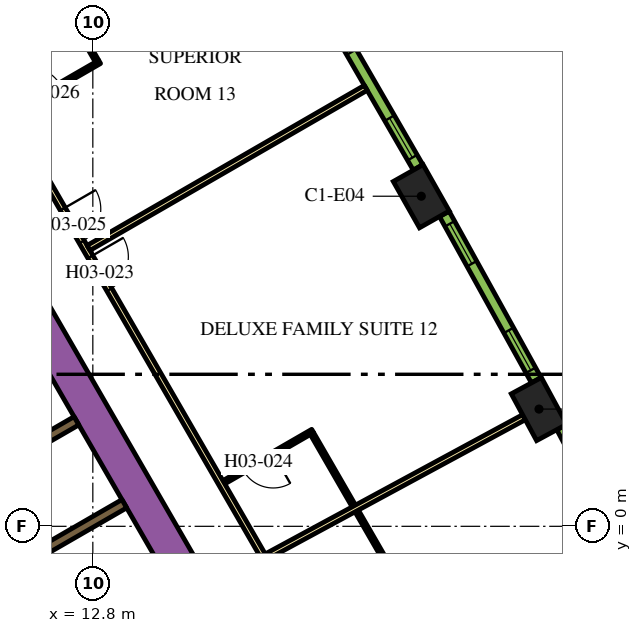
"""IFC4 building model, lengths in metres.
Left out: names, types, materials, properties, quantities, classifications, styles, units other than length and angle.
Written with IfcOpenShell. Run it as: python <this file> out.ifc"""

import sys

from ifc_helpers import new_model, si_unit, direction, frame, frame_2d, origin, origin_2d, place, context, subcontext, project, spatial, rectangle, extrude, element, fill, save


model = new_model("IFC4")
c1 = context("Model", 3, precision=1e-05, world=origin(), true_north=direction((0.0, 1.0)))
c2 = subcontext(c1, "Body", "Model", "MODEL_VIEW")
j1 = project(units=[si_unit("LENGTHUNIT", "METRE"), si_unit("PLANEANGLEUNIT", "RADIAN")], contexts=[c1])
p1 = place(None, origin())
s1 = spatial("IfcSite", under=j1, at=p1, CompositionType="ELEMENT")
p2 = place(p1, origin())
s2 = spatial("IfcBuilding", under=s1, at=p2, CompositionType="ELEMENT")
p3 = place(p2, frame((0.0, 0.0, 58.8)))
s3 = spatial("IfcBuildingStorey", under=s2, at=p3, CompositionType="ELEMENT", Elevation=58.8)
for number, where, z_axis, x_axis in (
    (1, (24.54, 3.085, 0.0), (0.0, 0.0, 1.0), (-0.476, 0.88, 0.0)),
    (2, (21.443, 8.685, 0.0), (0.0, 0.0, 1.0), (-0.492, 0.871, 0.0)),
):
    element("IfcColumn", number, at=place(p3, frame(where, z_axis=z_axis, x_axis=x_axis)), inside=s3, PredefinedType="COLUMN", context=c2, shape_type="SweptSolid", body=[
        extrude(rectangle(XDim=1.4, YDim=0.9, at=origin_2d()), origin(), (0.0, 0.0, 1.0), 3.9),
    ])
p4 = place(p3, frame((6.776, 13.364, 0.0), z_axis=(0.0, 0.0, 1.0), x_axis=(0.500004177138, -0.8660229921, 0.0)))
e3 = element("IfcWall", 3, at=p4, inside=s3, PredefinedType="SOLIDWALL", context=c2, shape_type="SweptSolid", body=[
    extrude(rectangle(XDim=20.204, YDim=0.9, at=frame_2d((10.102, 0.0))), origin(), (0.0, 0.0, 1.0), 3.9),
])
p5 = place(p3, frame((10.464, 1.677, 0.0), z_axis=(0.0, 0.0, 1.0), x_axis=(0.86605622881, 0.499946605688, 0.0)))
e4 = element("IfcWall", 4, at=p5, inside=s3, PredefinedType="SOLIDWALL", context=c2, shape_type="SweptSolid", body=[
    extrude(rectangle(XDim=2.2, YDim=0.25, at=frame_2d((1.1, 0.0))), origin(), (0.0, 0.0, 1.0), 3.9),
])
p6 = place(p3, frame((10.911, -0.975, 0.0), z_axis=(0.0, 0.0, 1.0), x_axis=(0.866046979468, 0.499962627957, 0.0)))
e5 = element("IfcWall", 5, at=p6, inside=s3, PredefinedType="SOLIDWALL", context=c2, shape_type="SweptSolid", body=[
    extrude(rectangle(XDim=3.138, YDim=0.25, at=frame_2d((1.569, 0.0))), origin(), (0.0, 0.0, 1.0), 3.9),
])
p7 = place(p3, frame((6.163, 18.475, 0.0), z_axis=(0.0, 0.0, 1.0), x_axis=(0.500001317485, -0.866024643133, 0.0)))
e6 = element("IfcWall", 6, at=p7, inside=s3, PredefinedType="PARTITIONING", context=c2, shape_type="SweptSolid", body=[
    extrude(rectangle(XDim=25.767, YDim=0.15, at=frame_2d((12.883, 0.0))), origin(), (0.0, 0.0, 1.0), 2.75),
])
p8 = place(p7, frame((24.586, 0.0, 0.0)))
e7 = element("IfcOpeningElement", 7, at=p8, cuts=e6, PredefinedType="OPENING", context=c2, shape_type="SweptSolid", body=[
    extrude(rectangle(XDim=1.0, YDim=2.1, at=frame_2d((0.5, 1.05))), frame((0.0, 0.085, 0.0), z_axis=(0.0, -1.0, 0.0), x_axis=(1.0, 0.0, 0.0)), (0.0, 0.0, 1.0), 0.17),
])
p9 = place(p7, frame((13.144, 0.0, 0.0)))
e8 = element("IfcOpeningElement", 8, at=p9, cuts=e6, PredefinedType="OPENING", context=c2, shape_type="SweptSolid", body=[
    extrude(rectangle(XDim=1.0, YDim=2.1, at=frame_2d((0.5, 1.05))), frame((0.0, 0.085, 0.0), z_axis=(0.0, -1.0, 0.0), x_axis=(1.0, 0.0, 0.0)), (0.0, 0.0, 1.0), 0.17),
])
p10 = place(p7, frame((11.692, 0.0, 0.0)))
e9 = element("IfcOpeningElement", 9, at=p10, cuts=e6, PredefinedType="OPENING", context=c2, shape_type="SweptSolid", body=[
    extrude(rectangle(XDim=1.0, YDim=2.1, at=frame_2d((0.5, 1.05))), frame((0.0, 0.085, 0.0), z_axis=(0.0, -1.0, 0.0), x_axis=(1.0, 0.0, 0.0)), (0.0, 0.0, 1.0), 0.17),
])
p11 = place(p7, frame((0.572, 0.0, 0.0)))
e10 = element("IfcOpeningElement", 10, at=p11, cuts=e6, PredefinedType="OPENING", context=c2, shape_type="SweptSolid", body=[
    extrude(rectangle(XDim=1.0, YDim=2.1, at=frame_2d((0.5, 1.05))), frame((0.0, 0.085, 0.0), z_axis=(0.0, -1.0, 0.0), x_axis=(1.0, 0.0, 0.0)), (0.0, 0.0, 1.0), 0.17),
])
p12 = place(p3, frame((19.982, 11.537, 0.0), z_axis=(0.0, 0.0, 1.0), x_axis=(-0.866020994654, -0.500007636761, 0.0)))
e11 = element("IfcWall", 11, at=p12, inside=s3, PredefinedType="PARTITIONING", context=c2, shape_type="SweptSolid", body=[
    extrude(rectangle(XDim=8.423, YDim=0.15, at=frame_2d((4.211, 0.0))), origin(), (0.0, 0.0, 1.0), 2.75),
])
p13 = place(p3, frame((24.145, 2.871, 0.0), z_axis=(0.0, 0.0, 1.0), x_axis=(-0.879551725039, -0.475803281809, 0.0)))
e12 = element("IfcWall", 12, at=p13, inside=s3, PredefinedType="PARTITIONING", context=c2, shape_type="SweptSolid", body=[
    extrude(rectangle(XDim=7.688, YDim=0.15, at=frame_2d((3.844, 0.0))), origin(), (0.0, 0.0, 1.0), 2.75),
])
p14 = place(p3, frame((20.716, -1.281, 0.0), z_axis=(0.0, 0.0, 1.0), x_axis=(-0.499969367985, 0.866043088465, 0.0)))
e13 = element("IfcWall", 13, at=p14, inside=s3, PredefinedType="PARTITIONING", context=c2, shape_type="SweptSolid", body=[
    extrude(rectangle(XDim=1.94, YDim=0.1, at=frame_2d((0.97, 0.0))), origin(), (0.0, 0.0, 1.0), 2.75),
])
p15 = place(p3, frame((18.586, 2.509, 0.0), z_axis=(0.0, 0.0, 1.0), x_axis=(-0.866059108428, -0.4999416173, 0.0)))
e14 = element("IfcWall", 14, at=p15, inside=s3, PredefinedType="PARTITIONING", context=c2, shape_type="SweptSolid", body=[
    extrude(rectangle(XDim=2.7, YDim=0.1, at=frame_2d((1.35, 0.0))), origin(), (0.0, 0.0, 1.0), 2.75),
])
p16 = place(p15, frame((1.2, 0.0, 0.0)))
e15 = element("IfcOpeningElement", 15, at=p16, cuts=e14, PredefinedType="OPENING", context=c2, shape_type="SweptSolid", body=[
    extrude(rectangle(XDim=0.9, YDim=2.1, at=frame_2d((0.45, 1.05))), frame((0.0, 0.06, 0.0), z_axis=(0.0, -1.0, 0.0), x_axis=(1.0, 0.0, 0.0)), (0.0, 0.0, 1.0), 0.12),
])
p17 = place(p3, frame((18.567, 2.441, 0.0), z_axis=(0.0, 0.0, 1.0), x_axis=(0.499946605688, -0.86605622881, 0.0)))
e16 = element("IfcWall", 16, at=p17, inside=s3, PredefinedType="PARTITIONING", context=c2, shape_type="SweptSolid", body=[
    extrude(rectangle(XDim=2.2, YDim=0.1, at=frame_2d((1.1, 0.0))), origin(), (0.0, 0.0, 1.0), 2.75),
])
p18 = place(p3, frame((10.64, 10.871, 0.0), z_axis=(0.0, 0.0, 1.0), x_axis=(0.866036505625, 0.499980770555, 0.0)))
e17 = element("IfcWall", 17, at=p18, inside=s3, PredefinedType="PARTITIONING", context=c2, shape_type="SweptSolid", body=[
    extrude(rectangle(XDim=2.7, YDim=0.1, at=frame_2d((1.35, 0.0))), origin(), (0.0, 0.0, 1.0), 2.75),
])
p19 = place(p18, frame((0.6, 0.0, 0.0)))
e18 = element("IfcOpeningElement", 18, at=p19, cuts=e17, PredefinedType="OPENING", context=c2, shape_type="SweptSolid", body=[
    extrude(rectangle(XDim=0.9, YDim=2.1, at=frame_2d((0.45, 1.05))), frame((0.0, 0.06, 0.0), z_axis=(0.0, -1.0, 0.0), x_axis=(1.0, 0.0, 0.0)), (0.0, 0.0, 1.0), 0.12),
])
p20 = place(p3, frame((12.91, 12.239, 0.0), z_axis=(0.0, 0.0, 1.0), x_axis=(-0.499957272447, 0.866050071143, 0.0)))
e19 = element("IfcWall", 19, at=p20, inside=s3, PredefinedType="PARTITIONING", context=c2, shape_type="SweptSolid", body=[
    extrude(rectangle(XDim=2.07, YDim=0.1, at=frame_2d((1.035, 0.0))), origin(), (0.0, 0.0, 1.0), 2.75),
])
p21 = place(p3, frame((27.475, -1.81, 0.0), z_axis=(0.0, 0.0, 1.0), x_axis=(-0.467629620899, 0.883924509026, 0.0)))
e20 = element("IfcWall", 20, at=p21, inside=s3, PredefinedType="SOLIDWALL", context=c2, shape_type="SweptSolid", body=[
    extrude(rectangle(XDim=4.998, YDim=0.29, at=frame_2d((2.499, 0.0))), origin(), (0.0, 0.0, 1.0), 3.65),
])
p22 = place(p21, frame((0.297, 0.0, 0.9)))
e21 = element("IfcOpeningElement", 21, at=p22, cuts=e20, PredefinedType="OPENING", context=c2, shape_type="SweptSolid", body=[
    extrude(rectangle(XDim=1.2, YDim=2.15, at=frame_2d((0.6, 1.075))), frame((0.0, 0.155, 0.0), z_axis=(0.0, -1.0, 0.0), x_axis=(1.0, 0.0, 0.0)), (0.0, 0.0, 1.0), 0.31),
])
p23 = place(p21, frame((3.501, 0.0, 0.9)))
e22 = element("IfcOpeningElement", 22, at=p23, cuts=e20, PredefinedType="OPENING", context=c2, shape_type="SweptSolid", body=[
    extrude(rectangle(XDim=1.2, YDim=2.15, at=frame_2d((0.6, 1.075))), frame((0.0, 0.155, 0.0), z_axis=(0.0, -1.0, 0.0), x_axis=(1.0, 0.0, 0.0)), (0.0, 0.0, 1.0), 0.31),
])
p24 = place(p3, frame((24.468, 3.846, 0.0), z_axis=(0.0, 0.0, 1.0), x_axis=(-0.483912572871, 0.875116347589, 0.0)))
e23 = element("IfcWall", 23, at=p24, inside=s3, PredefinedType="SOLIDWALL", context=c2, shape_type="SweptSolid", body=[
    extrude(rectangle(XDim=4.998, YDim=0.29, at=frame_2d((2.499, 0.0))), origin(), (0.0, 0.0, 1.0), 3.65),
])
p25 = place(p24, frame((0.297, 0.0, 0.9)))
e24 = element("IfcOpeningElement", 24, at=p25, cuts=e23, PredefinedType="OPENING", context=c2, shape_type="SweptSolid", body=[
    extrude(rectangle(XDim=1.2, YDim=2.15, at=frame_2d((0.6, 1.075))), frame((0.0, 0.155, 0.0), z_axis=(0.0, -1.0, 0.0), x_axis=(1.0, 0.0, 0.0)), (0.0, 0.0, 1.0), 0.31),
])
p26 = place(p24, frame((3.501, 0.0, 0.9)))
e25 = element("IfcOpeningElement", 25, at=p26, cuts=e23, PredefinedType="OPENING", context=c2, shape_type="SweptSolid", body=[
    extrude(rectangle(XDim=1.2, YDim=2.15, at=frame_2d((0.6, 1.075))), frame((0.0, 0.155, 0.0), z_axis=(0.0, -1.0, 0.0), x_axis=(1.0, 0.0, 0.0)), (0.0, 0.0, 1.0), 0.31),
])
p27 = place(p3, frame((21.357, 9.445, 0.0), z_axis=(0.0, 0.0, 1.0), x_axis=(-0.50002123722, 0.866013142123, 0.0)))
e26 = element("IfcWall", 26, at=p27, inside=s3, PredefinedType="SOLIDWALL", context=c2, shape_type="SweptSolid", body=[
    extrude(rectangle(XDim=4.998, YDim=0.29, at=frame_2d((2.499, 0.0))), origin(), (0.0, 0.0, 1.0), 3.65),
])
p28 = place(p27, frame((0.297, 0.0, 0.9)))
e27 = element("IfcOpeningElement", 27, at=p28, cuts=e26, PredefinedType="OPENING", context=c2, shape_type="SweptSolid", body=[
    extrude(rectangle(XDim=1.2, YDim=2.15, at=frame_2d((0.6, 1.075))), frame((0.0, 0.155, 0.0), z_axis=(0.0, -1.0, 0.0), x_axis=(1.0, 0.0, 0.0)), (0.0, 0.0, 1.0), 0.31),
])
p29 = place(p27, frame((3.501, 0.0, 0.9)))
e28 = element("IfcOpeningElement", 28, at=p29, cuts=e26, PredefinedType="OPENING", context=c2, shape_type="SweptSolid", body=[
    extrude(rectangle(XDim=1.2, YDim=2.15, at=frame_2d((0.6, 1.075))), frame((0.0, 0.155, 0.0), z_axis=(0.0, -1.0, 0.0), x_axis=(1.0, 0.0, 0.0)), (0.0, 0.0, 1.0), 0.31),
])
p30 = place(p9, origin())
e29 = element("IfcDoor", 29, at=p30, inside=s3, OperationType="SINGLE_SWING_LEFT", PredefinedType="DOOR", context=c2, shape_type="SweptSolid", body=[
    extrude(rectangle(XDim=1.0, YDim=2.1, at=frame_2d((0.5, 1.05))), frame((0.0, 0.025, 0.0), z_axis=(0.0, -1.0, 0.0), x_axis=(1.0, 0.0, 0.0)), (0.0, 0.0, 1.0), 0.05),
])
fill(e8, e29)
p31 = place(p16, origin())
e30 = element("IfcDoor", 30, at=p31, inside=s3, OperationType="SINGLE_SWING_RIGHT", PredefinedType="DOOR", context=c2, shape_type="SweptSolid", body=[
    extrude(rectangle(XDim=0.9, YDim=2.1, at=frame_2d((0.45, 1.05))), frame((0.0, 0.025, 0.0), z_axis=(0.0, -1.0, 0.0), x_axis=(1.0, 0.0, 0.0)), (0.0, 0.0, 1.0), 0.05),
])
fill(e15, e30)
p32 = place(p10, origin())
e31 = element("IfcDoor", 31, at=p32, inside=s3, OperationType="SINGLE_SWING_RIGHT", PredefinedType="DOOR", context=c2, shape_type="SweptSolid", body=[
    extrude(rectangle(XDim=1.0, YDim=2.1, at=frame_2d((0.5, 1.05))), frame((0.0, 0.025, 0.0), z_axis=(0.0, -1.0, 0.0), x_axis=(1.0, 0.0, 0.0)), (0.0, 0.0, 1.0), 0.05),
])
fill(e9, e31)
p33 = place(p19, origin())
e32 = element("IfcDoor", 32, at=p33, inside=s3, OperationType="SINGLE_SWING_LEFT", PredefinedType="DOOR", context=c2, shape_type="SweptSolid", body=[
    extrude(rectangle(XDim=0.9, YDim=2.1, at=frame_2d((0.45, 1.05))), frame((0.0, 0.025, 0.0), z_axis=(0.0, -1.0, 0.0), x_axis=(1.0, 0.0, 0.0)), (0.0, 0.0, 1.0), 0.05),
])
fill(e18, e32)
p34 = place(p25, origin())
e33 = element("IfcWindow", 33, at=p34, inside=s3, PartitioningType="DOUBLE_PANEL_VERTICAL", PredefinedType="WINDOW", context=c2, shape_type="SweptSolid", body=[
    extrude(rectangle(XDim=1.2, YDim=2.15, at=frame_2d((0.6, 1.075))), frame((0.0, 0.015, 0.0), z_axis=(0.0, -1.0, 0.0), x_axis=(1.0, 0.0, 0.0)), (0.0, 0.0, 1.0), 0.06),
])
fill(e24, e33)
p35 = place(p26, origin())
e34 = element("IfcWindow", 34, at=p35, inside=s3, PartitioningType="DOUBLE_PANEL_VERTICAL", PredefinedType="WINDOW", context=c2, shape_type="SweptSolid", body=[
    extrude(rectangle(XDim=1.2, YDim=2.15, at=frame_2d((0.6, 1.075))), frame((0.0, 0.015, 0.0), z_axis=(0.0, -1.0, 0.0), x_axis=(1.0, 0.0, 0.0)), (0.0, 0.0, 1.0), 0.06),
])
fill(e25, e34)
p36 = place(p28, origin())
e35 = element("IfcWindow", 35, at=p36, inside=s3, PartitioningType="DOUBLE_PANEL_VERTICAL", PredefinedType="WINDOW", context=c2, shape_type="SweptSolid", body=[
    extrude(rectangle(XDim=1.2, YDim=2.15, at=frame_2d((0.6, 1.075))), frame((0.0, 0.015, 0.0), z_axis=(0.0, -1.0, 0.0), x_axis=(1.0, 0.0, 0.0)), (0.0, 0.0, 1.0), 0.06),
])
fill(e27, e35)
save(model, sys.argv[1])
